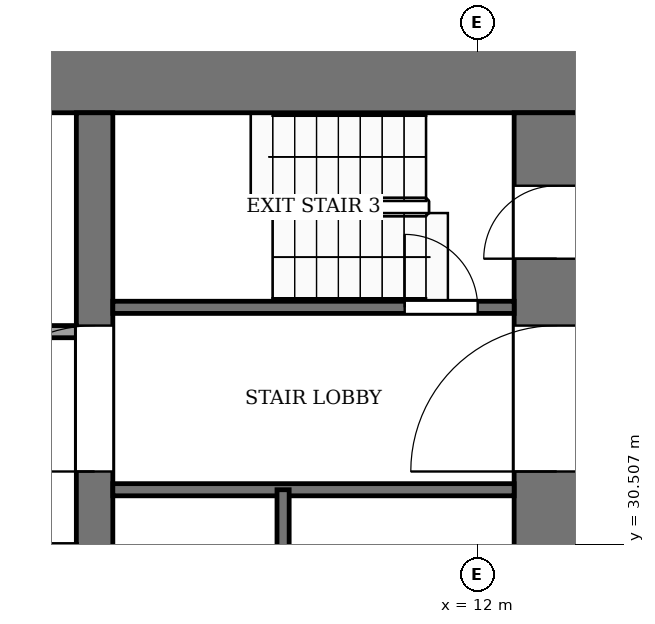
"""IFC4 building model, lengths in metres.
Left out: names, types, materials, properties, quantities, classifications, styles, units other than length and angle.
Written with IfcOpenShell. Run it as: python <this file> out.ifc"""

import sys

from ifc_helpers import new_model, si_unit, direction, frame, frame_2d, origin, place, context, subcontext, project, spatial, rectangle, extrude, element, fill, save


model = new_model("IFC4")
c1 = context("Model", 3, precision=1e-05, world=origin(), true_north=direction((0.0, 1.0)))
c2 = subcontext(c1, "Body", "Model", "MODEL_VIEW")
j1 = project(units=[si_unit("LENGTHUNIT", "METRE"), si_unit("PLANEANGLEUNIT", "RADIAN")], contexts=[c1])
p1 = place(None, origin())
s1 = spatial("IfcSite", under=j1, at=p1, CompositionType="ELEMENT")
p2 = place(p1, origin())
s2 = spatial("IfcBuilding", under=s1, at=p2, CompositionType="ELEMENT")
p3 = place(p2, frame((0.0, 0.0, -6.0)))
s3 = spatial("IfcBuildingStorey", under=s2, at=p3, CompositionType="ELEMENT", Elevation=-6.0)
p4 = place(p3, frame((-14.0, 38.3, 0.0), z_axis=(0.0, 0.0, 1.0), x_axis=(1.0, 0.0, 0.0)))
e1 = element("IfcWall", 1, at=p4, inside=s3, PredefinedType="SHEAR", context=c2, shape_type="SweptSolid", body=[
    extrude(rectangle(XDim=28.0, YDim=1.4, at=frame_2d((14.0, 0.0))), origin(), (0.0, 0.0, 1.0), 5.55),
])
p5 = place(p3, frame((13.3, 18.4, 0.0), z_axis=(0.0, 0.0, 1.0), x_axis=(0.0, 1.0, 0.0)))
e2 = element("IfcWall", 2, at=p5, inside=s3, PredefinedType="SHEAR", context=c2, shape_type="SweptSolid", body=[
    extrude(rectangle(XDim=19.2, YDim=1.4, at=frame_2d((9.6, 0.0))), origin(), (0.0, 0.0, 1.0), 5.55),
])
p6 = place(p5, frame((2.8, 0.0, 0.0)))
e3 = element("IfcOpeningElement", 3, at=p6, cuts=e2, PredefinedType="OPENING", context=c2, shape_type="SweptSolid", body=[
    extrude(rectangle(XDim=2.4, YDim=2.4, at=frame_2d((1.2, 1.2))), frame((0.0, 0.71, 0.0), z_axis=(0.0, -1.0, 0.0), x_axis=(1.0, 0.0, 0.0)), (0.0, 0.0, 1.0), 1.42),
])
p7 = place(p5, frame((13.3, 0.0, 0.0)))
e4 = element("IfcOpeningElement", 4, at=p7, cuts=e2, PredefinedType="OPENING", context=c2, shape_type="SweptSolid", body=[
    extrude(rectangle(XDim=2.4, YDim=2.4, at=frame_2d((1.2, 1.2))), frame((0.0, 0.71, 0.0), z_axis=(0.0, -1.0, 0.0), x_axis=(1.0, 0.0, 0.0)), (0.0, 0.0, 1.0), 1.42),
])
p8 = place(p5, frame((5.85, 0.0, 0.0)))
e5 = element("IfcOpeningElement", 5, at=p8, cuts=e2, PredefinedType="OPENING", context=c2, shape_type="SweptSolid", body=[
    extrude(rectangle(XDim=1.2, YDim=2.2, at=frame_2d((0.6, 1.1))), frame((0.0, 0.71, 0.0), z_axis=(0.0, -1.0, 0.0), x_axis=(1.0, 0.0, 0.0)), (0.0, 0.0, 1.0), 1.42),
])
p9 = place(p5, frame((16.8, 0.0, 0.0)))
e6 = element("IfcOpeningElement", 6, at=p9, cuts=e2, PredefinedType="OPENING", context=c2, shape_type="SweptSolid", body=[
    extrude(rectangle(XDim=1.2, YDim=2.2, at=frame_2d((0.6, 1.1))), frame((0.0, 0.71, 0.0), z_axis=(0.0, -1.0, 0.0), x_axis=(1.0, 0.0, 0.0)), (0.0, 0.0, 1.0), 1.42),
])
p10 = place(p3, frame((5.7, 18.4, 0.0), z_axis=(0.0, 0.0, 1.0), x_axis=(0.0, 1.0, 0.0)))
e7 = element("IfcWall", 7, at=p10, inside=s3, PredefinedType="SHEAR", context=c2, shape_type="SweptSolid", body=[
    extrude(rectangle(XDim=19.2, YDim=0.6, at=frame_2d((9.6, 0.0))), origin(), (0.0, 0.0, 1.0), 5.55),
])
p11 = place(p10, frame((13.3, 0.0, 0.0)))
e8 = element("IfcOpeningElement", 8, at=p11, cuts=e7, PredefinedType="OPENING", context=c2, shape_type="SweptSolid", body=[
    extrude(rectangle(XDim=2.4, YDim=2.4, at=frame_2d((1.2, 1.2))), frame((0.0, 0.31, 0.0), z_axis=(0.0, -1.0, 0.0), x_axis=(1.0, 0.0, 0.0)), (0.0, 0.0, 1.0), 0.62),
])
p12 = place(p3, frame((6.0, 31.4, 0.0), z_axis=(0.0, 0.0, 1.0), x_axis=(1.0, 0.0, 0.0)))
e9 = element("IfcWall", 9, at=p12, inside=s3, PredefinedType="PARTITIONING", context=c2, shape_type="SweptSolid", body=[
    extrude(rectangle(XDim=6.6, YDim=0.2, at=frame_2d((3.3, 0.0))), origin(), (0.0, 0.0, 1.0), 5.55),
])
p13 = place(p3, frame((-5.4, 34.0, 0.0), z_axis=(0.0, 0.0, 1.0), x_axis=(1.0, 0.0, 0.0)))
e10 = element("IfcWall", 10, at=p13, inside=s3, PredefinedType="PARTITIONING", context=c2, shape_type="SweptSolid", body=[
    extrude(rectangle(XDim=10.8, YDim=0.2, at=frame_2d((5.4, 0.0))), origin(), (0.0, 0.0, 1.0), 5.55),
])
p14 = place(p13, frame((6.15, 0.0, 0.0)))
e11 = element("IfcOpeningElement", 11, at=p14, cuts=e10, PredefinedType="OPENING", context=c2, shape_type="SweptSolid", body=[
    extrude(rectangle(XDim=1.2, YDim=2.2, at=frame_2d((0.6, 1.1))), frame((0.0, 0.11, 0.0), z_axis=(0.0, -1.0, 0.0), x_axis=(1.0, 0.0, 0.0)), (0.0, 0.0, 1.0), 0.22),
])
p15 = place(p13, frame((8.95, 0.0, 0.0)))
e12 = element("IfcOpeningElement", 12, at=p15, cuts=e10, PredefinedType="OPENING", context=c2, shape_type="SweptSolid", body=[
    extrude(rectangle(XDim=1.0, YDim=2.1, at=frame_2d((0.5, 1.05))), frame((0.0, 0.11, 0.0), z_axis=(0.0, -1.0, 0.0), x_axis=(1.0, 0.0, 0.0)), (0.0, 0.0, 1.0), 0.22),
])
p16 = place(p3, frame((6.0, 34.4, 0.0), z_axis=(0.0, 0.0, 1.0), x_axis=(1.0, 0.0, 0.0)))
e13 = element("IfcWall", 13, at=p16, inside=s3, PredefinedType="PARTITIONING", context=c2, shape_type="SweptSolid", body=[
    extrude(rectangle(XDim=6.6, YDim=0.2, at=frame_2d((3.3, 0.0))), origin(), (0.0, 0.0, 1.0), 5.55),
])
p17 = place(p16, frame((4.8, 0.0, 0.0)))
e14 = element("IfcOpeningElement", 14, at=p17, cuts=e13, PredefinedType="OPENING", context=c2, shape_type="SweptSolid", body=[
    extrude(rectangle(XDim=1.2, YDim=2.2, at=frame_2d((0.6, 1.1))), frame((0.0, 0.11, 0.0), z_axis=(0.0, -1.0, 0.0), x_axis=(1.0, 0.0, 0.0)), (0.0, 0.0, 1.0), 0.22),
])
p18 = place(p3, frame((8.8, 24.0, 0.0), z_axis=(0.0, 0.0, 1.0), x_axis=(0.0, 1.0, 0.0)))
e15 = element("IfcWall", 15, at=p18, inside=s3, PredefinedType="PARTITIONING", context=c2, shape_type="SweptSolid", body=[
    extrude(rectangle(XDim=7.4, YDim=0.2, at=frame_2d((3.7, 0.0))), origin(), (0.0, 0.0, 1.0), 5.55),
])
p19 = place(p17, origin())
e16 = element("IfcDoor", 16, at=p19, inside=s3, OperationType="SINGLE_SWING_RIGHT", PredefinedType="DOOR", context=c2, shape_type="SweptSolid", body=[
    extrude(rectangle(XDim=1.2, YDim=2.2, at=frame_2d((0.6, 1.1))), frame((0.0, 0.025, 0.0), z_axis=(0.0, -1.0, 0.0), x_axis=(1.0, 0.0, 0.0)), (0.0, 0.0, 1.0), 0.05),
])
fill(e14, e16)
p20 = place(p11, origin())
e17 = element("IfcDoor", 17, at=p20, inside=s3, OperationType="DOUBLE_DOOR_SINGLE_SWING", PredefinedType="DOOR", context=c2, shape_type="SweptSolid", body=[
    extrude(rectangle(XDim=2.4, YDim=2.4, at=frame_2d((1.2, 1.2))), frame((0.0, 0.025, 0.0), z_axis=(0.0, -1.0, 0.0), x_axis=(1.0, 0.0, 0.0)), (0.0, 0.0, 1.0), 0.05),
])
fill(e8, e17)
p21 = place(p7, origin())
e18 = element("IfcDoor", 18, at=p21, inside=s3, OperationType="DOUBLE_DOOR_SINGLE_SWING", PredefinedType="DOOR", context=c2, shape_type="SweptSolid", body=[
    extrude(rectangle(XDim=2.4, YDim=2.4, at=frame_2d((1.2, 1.2))), frame((0.0, 0.025, 0.0), z_axis=(0.0, -1.0, 0.0), x_axis=(1.0, 0.0, 0.0)), (0.0, 0.0, 1.0), 0.05),
])
fill(e4, e18)
p22 = place(p9, origin())
e19 = element("IfcDoor", 19, at=p22, inside=s3, OperationType="SINGLE_SWING_RIGHT", PredefinedType="DOOR", context=c2, shape_type="SweptSolid", body=[
    extrude(rectangle(XDim=1.2, YDim=2.2, at=frame_2d((0.6, 1.1))), frame((0.0, 0.025, 0.0), z_axis=(0.0, -1.0, 0.0), x_axis=(1.0, 0.0, 0.0)), (0.0, 0.0, 1.0), 0.05),
])
fill(e6, e19)
save(model, sys.argv[1])
